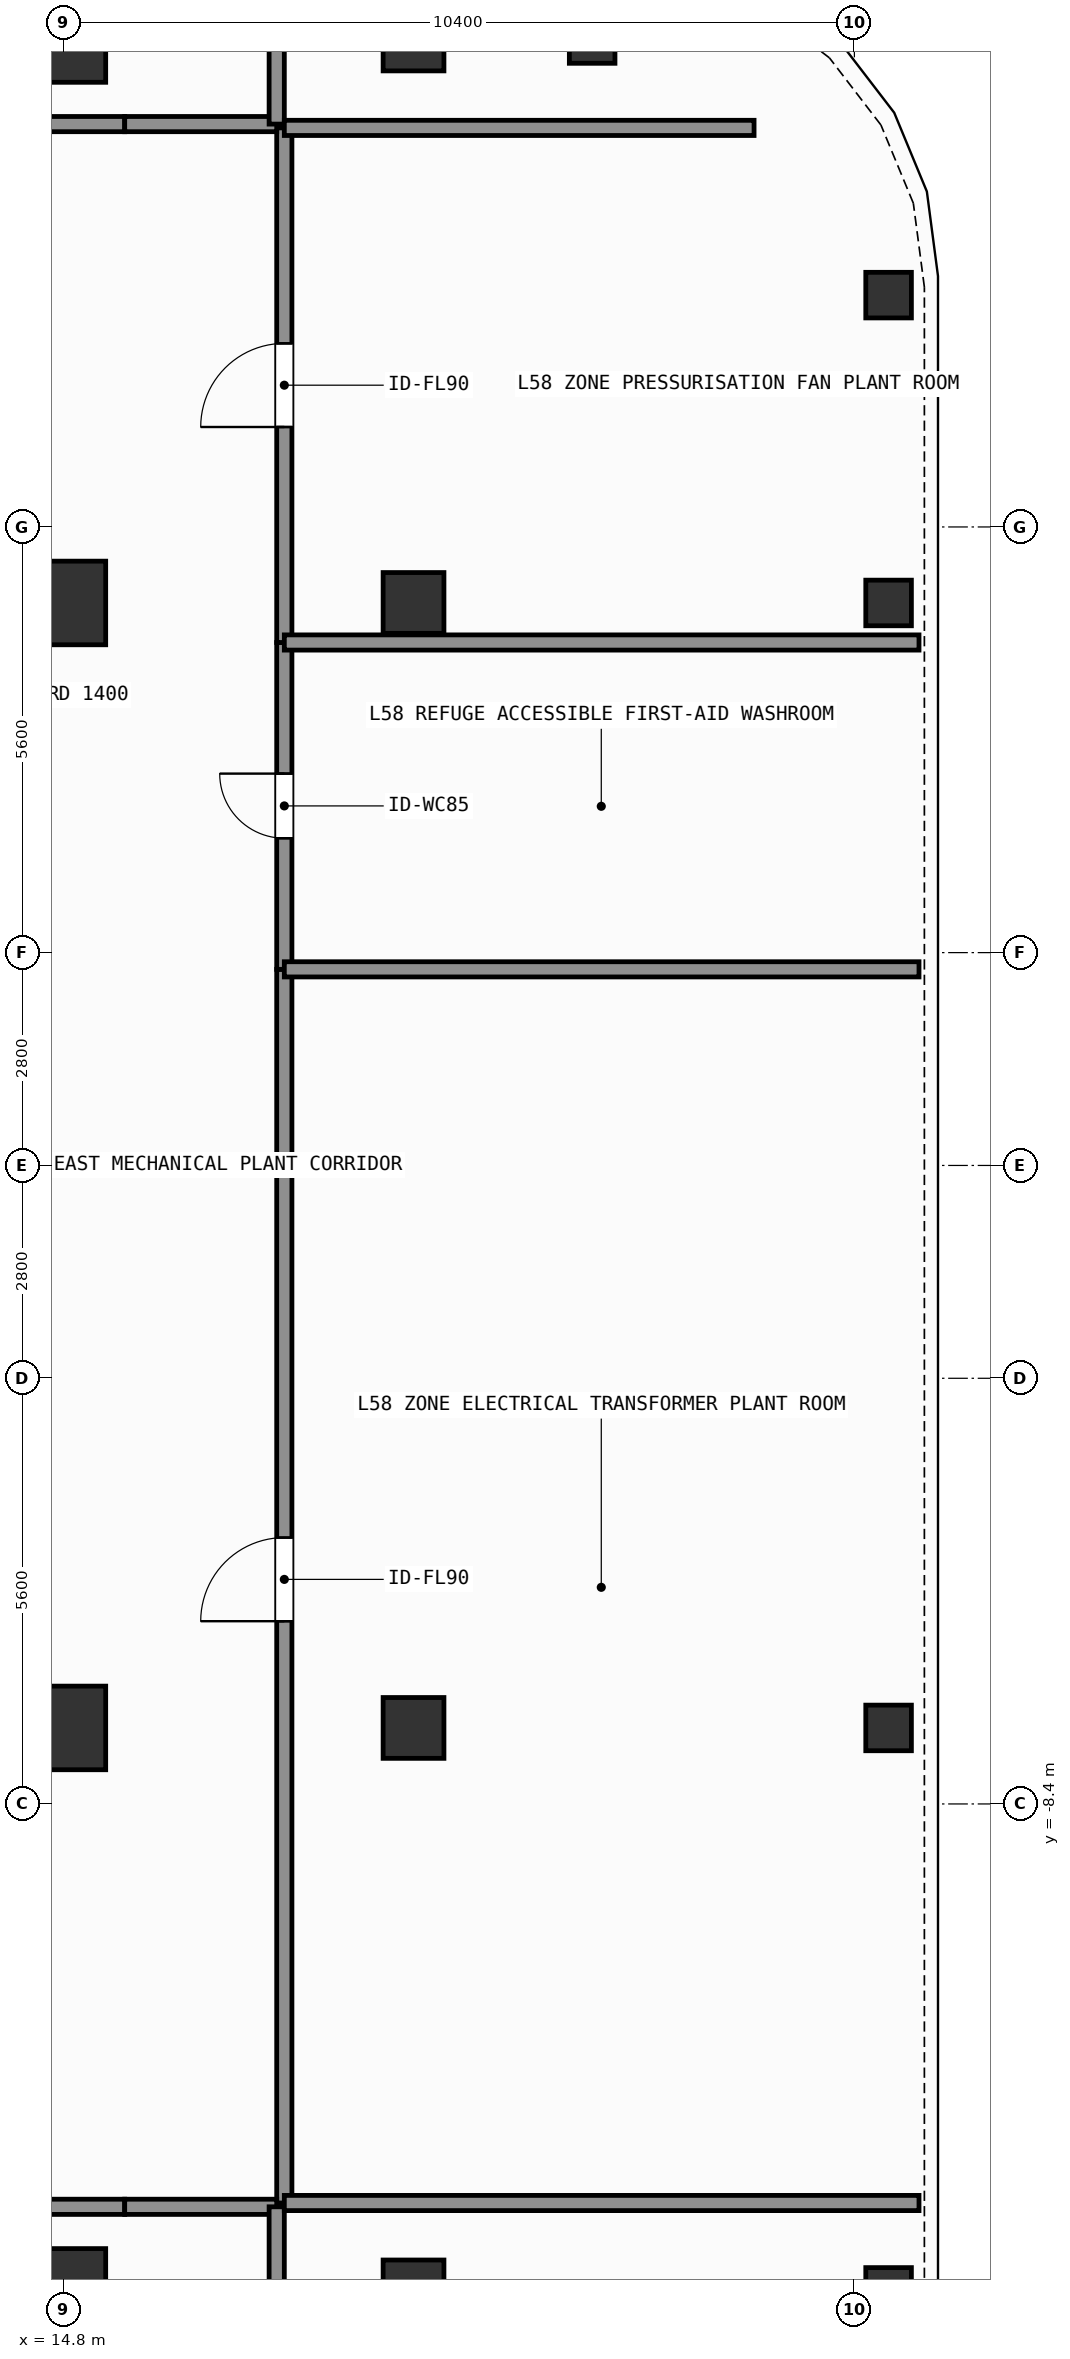
"""IFC4 building model, lengths in metres.
Left out: names, types, materials, properties, quantities, classifications, styles, units other than length and angle.
Written with IfcOpenShell. Run it as: python <this file> out.ifc"""

import sys

from ifc_helpers import new_model, si_unit, direction, frame, frame_2d, origin, origin_2d, place, context, subcontext, project, spatial, rectangle, hollow_rectangle, extrude, element, fill, save


model = new_model("IFC4")
c1 = context("Model", 3, precision=1e-05, world=origin(), true_north=direction((0.0, 1.0)))
c2 = subcontext(c1, "Body", "Model", "MODEL_VIEW")
j1 = project(units=[si_unit("LENGTHUNIT", "METRE"), si_unit("PLANEANGLEUNIT", "RADIAN")], contexts=[c1])
p1 = place(None, origin())
s1 = spatial("IfcSite", under=j1, at=p1, CompositionType="ELEMENT")
p2 = place(p1, origin())
s2 = spatial("IfcBuilding", under=s1, at=p2, CompositionType="ELEMENT")
p3 = place(p2, frame((0.0, 0.0, 235.2)))
s3 = spatial("IfcBuildingStorey", under=s2, at=p3, CompositionType="ELEMENT", Elevation=235.2)
for number, where, z_axis, x_axis in (
    (1, (14.8, -14.8, 0.0), (0.0, 0.0, 1.0), (1.0, 0.0, 0.0)),
    (2, (14.8, 14.8, 0.0), (0.0, 0.0, 1.0), (1.0, 0.0, 0.0)),
    (3, (14.8, -7.4, 0.0), (0.0, 0.0, 1.0), (1.0, 0.0, 0.0)),
    (4, (14.8, 7.4, 0.0), (0.0, 0.0, 1.0), (1.0, 0.0, 0.0)),
):
    element("IfcColumn", number, at=place(p3, frame(where, z_axis=z_axis, x_axis=x_axis)), inside=s3, PredefinedType="COLUMN", context=c2, shape_type="SweptSolid", body=[
        extrude(rectangle(XDim=1.1, YDim=1.1, at=origin_2d()), origin(), (0.0, 0.0, 1.0), 7.8),
    ])
for number, where, z_axis, x_axis in (
    (5, (19.4, -14.8, 0.0), (0.0, 0.0, 1.0), (1.0, 0.0, 0.0)),
    (6, (19.4, -7.4, 0.0), (0.0, 0.0, 1.0), (1.0, 0.0, 0.0)),
    (7, (19.4, 7.4, 0.0), (0.0, 0.0, 1.0), (1.0, 0.0, 0.0)),
    (8, (19.4, 14.8, 0.0), (0.0, 0.0, 1.0), (1.0, 0.0, 0.0)),
):
    element("IfcColumn", number, at=place(p3, frame(where, z_axis=z_axis, x_axis=x_axis)), inside=s3, PredefinedType="COLUMN", context=c2, shape_type="SweptSolid", body=[
        extrude(hollow_rectangle(XDim=0.8, YDim=0.8, WallThickness=0.036, at=origin_2d()), origin(), (0.0, 0.0, 1.0), 7.8),
    ])
for number, where, z_axis, x_axis in (
    (9, (21.75, 14.8, 0.0), (0.0, 0.0, 1.0), (1.0, 0.0, 0.0)),
    (10, (25.65, 11.45, 0.0), (0.0, 0.0, 1.0), (1.0, 0.0, 0.0)),
    (11, (25.65, -14.8, 0.0), (0.0, 0.0, 1.0), (1.0, 0.0, 0.0)),
    (12, (25.65, -7.4, 0.0), (0.0, 0.0, 1.0), (1.0, 0.0, 0.0)),
    (13, (25.65, 7.4, 0.0), (0.0, 0.0, 1.0), (1.0, 0.0, 0.0)),
):
    element("IfcColumn", number, at=place(p3, frame(where, z_axis=z_axis, x_axis=x_axis)), inside=s3, PredefinedType="COLUMN", context=c2, shape_type="SweptSolid", body=[
        extrude(hollow_rectangle(XDim=0.6, YDim=0.6, WallThickness=0.028, at=origin_2d()), origin(), (0.0, 0.0, 1.0), 7.8),
    ])
p4 = place(p3, frame((-11.55, -13.7, 0.0), z_axis=(0.0, 0.0, 1.0), x_axis=(1.0, 0.0, 0.0)))
e14 = element("IfcWall", 14, at=p4, inside=s3, PredefinedType="SOLIDWALL", context=c2, shape_type="SweptSolid", body=[
    extrude(rectangle(XDim=27.15, YDim=0.2, at=frame_2d((13.575, 0.0))), origin(), (0.0, 0.0, 1.0), 7.58),
])
p5 = place(p4, frame((9.114, 0.0, 0.0)))
e15 = element("IfcOpeningElement", 15, at=p5, cuts=e14, PredefinedType="OPENING", context=c2, shape_type="SweptSolid", body=[
    extrude(rectangle(XDim=1.4, YDim=2.2, at=frame_2d((0.7, 1.1))), frame((0.0, 0.11, 0.0), z_axis=(0.0, -1.0, 0.0), x_axis=(1.0, 0.0, 0.0)), (0.0, 0.0, 1.0), 0.22),
])
p6 = place(p3, frame((-11.55, 13.7, 0.0), z_axis=(0.0, 0.0, 1.0), x_axis=(1.0, 0.0, 0.0)))
e16 = element("IfcWall", 16, at=p6, inside=s3, PredefinedType="SOLIDWALL", context=c2, shape_type="SweptSolid", body=[
    extrude(rectangle(XDim=27.15, YDim=0.2, at=frame_2d((13.575, 0.0))), origin(), (0.0, 0.0, 1.0), 7.58),
])
p7 = place(p6, frame((9.114, 0.0, 0.0)))
e17 = element("IfcOpeningElement", 17, at=p7, cuts=e16, PredefinedType="OPENING", context=c2, shape_type="SweptSolid", body=[
    extrude(rectangle(XDim=1.4, YDim=2.2, at=frame_2d((0.7, 1.1))), frame((0.0, 0.11, 0.0), z_axis=(0.0, -1.0, 0.0), x_axis=(1.0, 0.0, 0.0)), (0.0, 0.0, 1.0), 0.22),
])
p8 = place(p3, frame((17.7, -13.65, 0.0), z_axis=(0.0, 0.0, 1.0), x_axis=(0.0, 1.0, 0.0)))
e18 = element("IfcWall", 18, at=p8, inside=s3, PredefinedType="SOLIDWALL", context=c2, shape_type="SweptSolid", body=[
    extrude(rectangle(XDim=16.23, YDim=0.2, at=frame_2d((8.115, 0.0))), origin(), (0.0, 0.0, 1.0), 7.58),
])
p9 = place(p8, frame((7.654, 0.0, 0.0)))
e19 = element("IfcOpeningElement", 19, at=p9, cuts=e18, PredefinedType="OPENING", context=c2, shape_type="SweptSolid", body=[
    extrude(rectangle(XDim=1.1, YDim=2.15, at=frame_2d((0.55, 1.075))), frame((0.0, 0.11, 0.0), z_axis=(0.0, -1.0, 0.0), x_axis=(1.0, 0.0, 0.0)), (0.0, 0.0, 1.0), 0.22),
])
p10 = place(p3, frame((17.7, 2.58, 0.0), z_axis=(0.0, 0.0, 1.0), x_axis=(0.0, 1.0, 0.0)))
e20 = element("IfcWall", 20, at=p10, inside=s3, PredefinedType="SOLIDWALL", context=c2, shape_type="SweptSolid", body=[
    extrude(rectangle(XDim=4.3, YDim=0.2, at=frame_2d((2.15, 0.0))), origin(), (0.0, 0.0, 1.0), 7.58),
])
p11 = place(p10, frame((1.725, 0.0, 0.0)))
e21 = element("IfcOpeningElement", 21, at=p11, cuts=e20, PredefinedType="OPENING", context=c2, shape_type="SweptSolid", body=[
    extrude(rectangle(XDim=0.85, YDim=2.1, at=frame_2d((0.425, 1.05))), frame((0.0, 0.11, 0.0), z_axis=(0.0, -1.0, 0.0), x_axis=(1.0, 0.0, 0.0)), (0.0, 0.0, 1.0), 0.22),
])
p12 = place(p3, frame((17.7, 6.88, 0.0), z_axis=(0.0, 0.0, 1.0), x_axis=(0.0, 1.0, 0.0)))
e22 = element("IfcWall", 22, at=p12, inside=s3, PredefinedType="SOLIDWALL", context=c2, shape_type="SweptSolid", body=[
    extrude(rectangle(XDim=6.77, YDim=0.2, at=frame_2d((3.385, 0.0))), origin(), (0.0, 0.0, 1.0), 7.58),
])
p13 = place(p12, frame((2.835, 0.0, 0.0)))
e23 = element("IfcOpeningElement", 23, at=p13, cuts=e22, PredefinedType="OPENING", context=c2, shape_type="SweptSolid", body=[
    extrude(rectangle(XDim=1.1, YDim=2.15, at=frame_2d((0.55, 1.075))), frame((0.0, 0.11, 0.0), z_axis=(0.0, -1.0, 0.0), x_axis=(1.0, 0.0, 0.0)), (0.0, 0.0, 1.0), 0.22),
])
for number, where, z_axis, x_axis in (
    (24, (15.6, -13.7, 0.0), (0.0, 0.0, 1.0), (1.0, 0.0, 0.0)),
    (25, (15.6, 13.7, 0.0), (0.0, 0.0, 1.0), (1.0, 0.0, 0.0)),
):
    element("IfcWall", number, at=place(p3, frame(where, z_axis=z_axis, x_axis=x_axis)), inside=s3, PredefinedType="SOLIDWALL", context=c2, shape_type="SweptSolid", body=[
        extrude(rectangle(XDim=2.0, YDim=0.2, at=frame_2d((1.0, 0.0))), origin(), (0.0, 0.0, 1.0), 7.58),
    ])
p14 = place(p3, frame((17.6, -28.55, 0.0), z_axis=(0.0, 0.0, 1.0), x_axis=(0.0, 1.0, 0.0)))
e26 = element("IfcWall", 26, at=p14, inside=s3, PredefinedType="SOLIDWALL", context=c2, shape_type="SweptSolid", body=[
    extrude(rectangle(XDim=14.85, YDim=0.2, at=frame_2d((7.425, 0.0))), origin(), (0.0, 0.0, 1.0), 7.58),
])
p15 = place(p3, frame((17.6, 13.7, 0.0), z_axis=(0.0, 0.0, 1.0), x_axis=(0.0, 1.0, 0.0)))
e27 = element("IfcWall", 27, at=p15, inside=s3, PredefinedType="SOLIDWALL", context=c2, shape_type="SweptSolid", body=[
    extrude(rectangle(XDim=2.05, YDim=0.2, at=frame_2d((1.025, 0.0))), origin(), (0.0, 0.0, 1.0), 7.58),
])
p16 = place(p3, frame((17.7, -13.65, 0.0), z_axis=(0.0, 0.0, 1.0), x_axis=(1.0, 0.0, 0.0)))
e28 = element("IfcWall", 28, at=p16, inside=s3, PredefinedType="SOLIDWALL", context=c2, shape_type="SweptSolid", body=[
    extrude(rectangle(XDim=8.35, YDim=0.2, at=frame_2d((4.175, 0.0))), origin(), (0.0, 0.0, 1.0), 7.58),
])
p17 = place(p3, frame((17.7, 13.65, 0.0), z_axis=(0.0, 0.0, 1.0), x_axis=(1.0, 0.0, 0.0)))
e29 = element("IfcWall", 29, at=p17, inside=s3, PredefinedType="SOLIDWALL", context=c2, shape_type="SweptSolid", body=[
    extrude(rectangle(XDim=6.18, YDim=0.2, at=frame_2d((3.09, 0.0))), origin(), (0.0, 0.0, 1.0), 7.58),
])
for number, where, z_axis, x_axis in (
    (30, (17.7, 2.58, 0.0), (0.0, 0.0, 1.0), (1.0, 0.0, 0.0)),
    (31, (17.7, 6.88, 0.0), (0.0, 0.0, 1.0), (1.0, 0.0, 0.0)),
):
    element("IfcWall", number, at=place(p3, frame(where, z_axis=z_axis, x_axis=x_axis)), inside=s3, PredefinedType="SOLIDWALL", context=c2, shape_type="SweptSolid", body=[
        extrude(rectangle(XDim=8.35, YDim=0.2, at=frame_2d((4.175, 0.0))), origin(), (0.0, 0.0, 1.0), 7.58),
    ])
p18 = place(p9, origin())
e32 = element("IfcDoor", 32, at=p18, inside=s3, OperationType="SINGLE_SWING_LEFT", PredefinedType="DOOR", context=c2, shape_type="SweptSolid", body=[
    extrude(rectangle(XDim=1.1, YDim=2.15, at=frame_2d((0.55, 1.075))), frame((0.0, 0.025, 0.0), z_axis=(0.0, -1.0, 0.0), x_axis=(1.0, 0.0, 0.0)), (0.0, 0.0, 1.0), 0.05),
])
fill(e19, e32)
p19 = place(p11, origin())
e33 = element("IfcDoor", 33, at=p19, inside=s3, OperationType="SINGLE_SWING_RIGHT", PredefinedType="DOOR", context=c2, shape_type="SweptSolid", body=[
    extrude(rectangle(XDim=0.85, YDim=2.1, at=frame_2d((0.425, 1.05))), frame((0.0, 0.025, 0.0), z_axis=(0.0, -1.0, 0.0), x_axis=(1.0, 0.0, 0.0)), (0.0, 0.0, 1.0), 0.05),
])
fill(e21, e33)
p20 = place(p13, origin())
e34 = element("IfcDoor", 34, at=p20, inside=s3, OperationType="SINGLE_SWING_LEFT", PredefinedType="DOOR", context=c2, shape_type="SweptSolid", body=[
    extrude(rectangle(XDim=1.1, YDim=2.15, at=frame_2d((0.55, 1.075))), frame((0.0, 0.025, 0.0), z_axis=(0.0, -1.0, 0.0), x_axis=(1.0, 0.0, 0.0)), (0.0, 0.0, 1.0), 0.05),
])
fill(e23, e34)
save(model, sys.argv[1])
